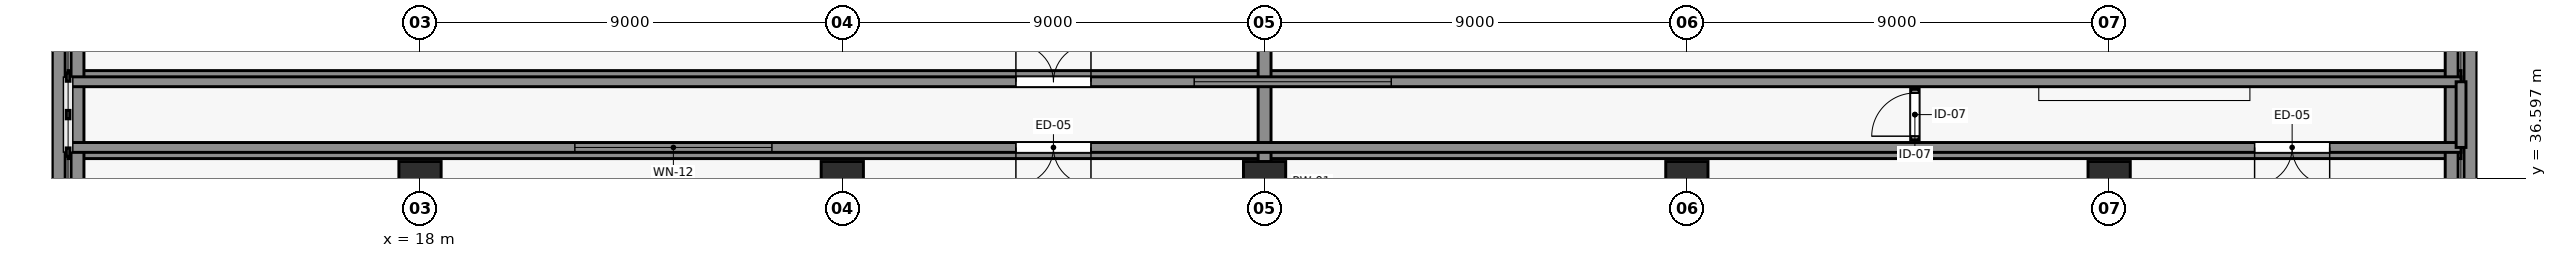
"""IFC4 building model, lengths in metres.
Left out: names, types, materials, properties, quantities, classifications, styles, units other than length and angle.
Written with IfcOpenShell. Run it as: python <this file> out.ifc"""

import sys

from ifc_helpers import new_model, si_unit, direction, frame, frame_2d, origin, origin_2d, place, context, subcontext, project, spatial, rectangle, extrude, element, fill, save


model = new_model("IFC4")
c1 = context("Model", 3, precision=1e-05, world=origin(), true_north=direction((0.0, 1.0)))
c2 = subcontext(c1, "Body", "Model", "MODEL_VIEW")
j1 = project(units=[si_unit("LENGTHUNIT", "METRE"), si_unit("PLANEANGLEUNIT", "RADIAN")], contexts=[c1])
p1 = place(None, origin())
s1 = spatial("IfcSite", under=j1, at=p1, CompositionType="ELEMENT")
p2 = place(p1, origin())
s2 = spatial("IfcBuilding", under=s1, at=p2, CompositionType="ELEMENT")
p3 = place(p2, origin())
s3 = spatial("IfcBuildingStorey", under=s2, at=p3, CompositionType="ELEMENT", Elevation=0.0)
for number, where, z_axis, x_axis in (
    (1, (10.5, 37.15, 0.0), (0.0, 0.0, 1.0), (1.0, 0.0, 0.0)),
    (2, (10.5, 38.75, 0.0), (0.0, 0.0, 1.0), (1.0, 0.0, 0.0)),
):
    element("IfcWall", number, at=place(p3, frame(where, z_axis=z_axis, x_axis=x_axis)), inside=s3, PredefinedType="SOLIDWALL", context=c2, shape_type="SweptSolid", body=[
        extrude(rectangle(XDim=51.0, YDim=0.275, at=frame_2d((25.5, 0.0))), origin(), (0.0, 0.0, 1.0), 0.675),
    ])
for number, where, z_axis, x_axis in (
    (3, (10.3, 36.15, 0.0), (0.0, 0.0, 1.0), (0.0, 1.0, 0.0)),
    (4, (10.7, 36.15, 0.0), (0.0, 0.0, 1.0), (0.0, 1.0, 0.0)),
    (5, (36.0, 36.15, 0.0), (0.0, 0.0, 1.0), (0.0, 1.0, 0.0)),
    (6, (61.3, 36.15, 0.0), (0.0, 0.0, 1.0), (0.0, 1.0, 0.0)),
    (7, (61.7, 36.15, 0.0), (0.0, 0.0, 1.0), (0.0, 1.0, 0.0)),
):
    element("IfcWall", number, at=place(p3, frame(where, z_axis=z_axis, x_axis=x_axis)), inside=s3, PredefinedType="SOLIDWALL", context=c2, shape_type="SweptSolid", body=[
        extrude(rectangle(XDim=3.6, YDim=0.275, at=frame_2d((1.8, 0.0))), origin(), (0.0, 0.0, 1.0), 0.675),
    ])
for number, where, z_axis, x_axis in (
    (8, (18.0, 36.5, 0.0), (0.0, 0.0, 1.0), (1.0, 0.0, 0.0)),
    (9, (27.0, 36.5, 0.0), (0.0, 0.0, 1.0), (1.0, 0.0, 0.0)),
    (10, (36.0, 36.5, 0.0), (0.0, 0.0, 1.0), (1.0, 0.0, 0.0)),
    (11, (45.0, 36.5, 0.0), (0.0, 0.0, 1.0), (1.0, 0.0, 0.0)),
    (12, (54.0, 36.5, 0.0), (0.0, 0.0, 1.0), (1.0, 0.0, 0.0)),
):
    element("IfcColumn", number, at=place(p3, frame(where, z_axis=z_axis, x_axis=x_axis)), inside=s3, PredefinedType="COLUMN", context=c2, shape_type="SweptSolid", body=[
        extrude(rectangle(XDim=0.9, YDim=0.9, at=origin_2d()), origin(), (0.0, 0.0, 1.0), 4.8),
    ])
p4 = place(p3, frame((61.5, 37.25, 0.915), z_axis=(0.0, 0.0, 1.0), x_axis=(-1.0, 0.0, 0.0)))
e13 = element("IfcWall", 13, at=p4, inside=s3, PredefinedType="SOLIDWALL", context=c2, shape_type="SweptSolid", body=[
    extrude(rectangle(XDim=51.0, YDim=0.21, at=frame_2d((25.5, 0.0))), origin(), (0.0, 0.0, 1.0), 3.185),
])
p5 = place(p4, frame((29.2, 0.0, 0.0)))
e14 = element("IfcOpeningElement", 14, at=p5, cuts=e13, PredefinedType="OPENING", context=c2, shape_type="SweptSolid", body=[
    extrude(rectangle(XDim=1.6, YDim=2.3, at=frame_2d((0.8, 1.15))), frame((0.0, 0.115, 0.0), z_axis=(0.0, -1.0, 0.0), x_axis=(1.0, 0.0, 0.0)), (0.0, 0.0, 1.0), 0.23),
])
p6 = place(p4, frame((2.8, 0.0, 0.0)))
e15 = element("IfcOpeningElement", 15, at=p6, cuts=e13, PredefinedType="OPENING", context=c2, shape_type="SweptSolid", body=[
    extrude(rectangle(XDim=1.6, YDim=2.3, at=frame_2d((0.8, 1.15))), frame((0.0, 0.115, 0.0), z_axis=(0.0, -1.0, 0.0), x_axis=(1.0, 0.0, 0.0)), (0.0, 0.0, 1.0), 0.23),
])
p7 = place(p4, frame((36.0, 0.0, 0.9)))
e16 = element("IfcOpeningElement", 16, at=p7, cuts=e13, PredefinedType="OPENING", context=c2, shape_type="SweptSolid", body=[
    extrude(rectangle(XDim=4.2, YDim=1.5, at=frame_2d((2.1, 0.75))), frame((0.0, 0.115, 0.0), z_axis=(0.0, -1.0, 0.0), x_axis=(1.0, 0.0, 0.0)), (0.0, 0.0, 1.0), 0.23),
])
p8 = place(p3, frame((10.5, 38.65, 0.915), z_axis=(0.0, 0.0, 1.0), x_axis=(1.0, 0.0, 0.0)))
e17 = element("IfcWall", 17, at=p8, inside=s3, PredefinedType="SOLIDWALL", context=c2, shape_type="SweptSolid", body=[
    extrude(rectangle(XDim=51.0, YDim=0.21, at=frame_2d((25.5, 0.0))), origin(), (0.0, 0.0, 1.0), 3.185),
])
p9 = place(p8, frame((20.2, 0.0, 0.0)))
e18 = element("IfcOpeningElement", 18, at=p9, cuts=e17, PredefinedType="OPENING", context=c2, shape_type="SweptSolid", body=[
    extrude(rectangle(XDim=1.6, YDim=2.3, at=frame_2d((0.8, 1.15))), frame((0.0, 0.115, 0.0), z_axis=(0.0, -1.0, 0.0), x_axis=(1.0, 0.0, 0.0)), (0.0, 0.0, 1.0), 0.23),
])
p10 = place(p8, frame((24.0, 0.0, 0.9)))
e19 = element("IfcOpeningElement", 19, at=p10, cuts=e17, PredefinedType="OPENING", context=c2, shape_type="SweptSolid", body=[
    extrude(rectangle(XDim=4.2, YDim=1.5, at=frame_2d((2.1, 0.75))), frame((0.0, 0.115, 0.0), z_axis=(0.0, -1.0, 0.0), x_axis=(1.0, 0.0, 0.0)), (0.0, 0.0, 1.0), 0.23),
])
p11 = place(p3, frame((61.5, 38.65, 0.915), z_axis=(0.0, 0.0, 1.0), x_axis=(0.0, -1.0, 0.0)))
e20 = element("IfcWall", 20, at=p11, inside=s3, PredefinedType="SOLIDWALL", context=c2, shape_type="SweptSolid", body=[
    extrude(rectangle(XDim=1.4, YDim=0.21, at=frame_2d((0.7, 0.0))), origin(), (0.0, 0.0, 1.0), 3.185),
])
p12 = place(p3, frame((49.86, 37.41, 0.915), z_axis=(0.0, 0.0, 1.0), x_axis=(0.0, 1.0, 0.0)))
e21 = element("IfcWall", 21, at=p12, inside=s3, PredefinedType="PARTITIONING", context=c2, shape_type="SweptSolid", body=[
    extrude(rectangle(XDim=1.08, YDim=0.18, at=frame_2d((0.54, 0.0))), origin(), (0.0, 0.0, 1.0), 3.435),
])
p13 = place(p12, frame((0.08, 0.0, 0.0)))
e22 = element("IfcOpeningElement", 22, at=p13, cuts=e21, PredefinedType="OPENING", context=c2, shape_type="SweptSolid", body=[
    extrude(rectangle(XDim=0.92, YDim=2.1, at=frame_2d((0.46, 1.05))), frame((0.0, 0.1, 0.0), z_axis=(0.0, -1.0, 0.0), x_axis=(1.0, 0.0, 0.0)), (0.0, 0.0, 1.0), 0.2),
])
p14 = place(p5, origin())
e23 = element("IfcDoor", 23, at=p14, inside=s3, OperationType="DOUBLE_DOOR_SINGLE_SWING", PredefinedType="DOOR", context=c2, shape_type="SweptSolid", body=[
    extrude(rectangle(XDim=1.6, YDim=2.3, at=frame_2d((0.8, 1.15))), frame((0.0, 0.025, 0.0), z_axis=(0.0, -1.0, 0.0), x_axis=(1.0, 0.0, 0.0)), (0.0, 0.0, 1.0), 0.05),
])
fill(e14, e23)
p15 = place(p6, origin())
e24 = element("IfcDoor", 24, at=p15, inside=s3, OperationType="DOUBLE_DOOR_SINGLE_SWING", PredefinedType="DOOR", context=c2, shape_type="SweptSolid", body=[
    extrude(rectangle(XDim=1.6, YDim=2.3, at=frame_2d((0.8, 1.15))), frame((0.0, 0.025, 0.0), z_axis=(0.0, -1.0, 0.0), x_axis=(1.0, 0.0, 0.0)), (0.0, 0.0, 1.0), 0.05),
])
fill(e15, e24)
p16 = place(p9, origin())
e25 = element("IfcDoor", 25, at=p16, inside=s3, OperationType="DOUBLE_DOOR_SINGLE_SWING", PredefinedType="DOOR", context=c2, shape_type="SweptSolid", body=[
    extrude(rectangle(XDim=1.6, YDim=2.3, at=frame_2d((0.8, 1.15))), frame((0.0, 0.025, 0.0), z_axis=(0.0, -1.0, 0.0), x_axis=(1.0, 0.0, 0.0)), (0.0, 0.0, 1.0), 0.05),
])
fill(e18, e25)
p17 = place(p7, origin())
e26 = element("IfcWindow", 26, at=p17, inside=s3, PartitioningType="SINGLE_PANEL", PredefinedType="WINDOW", context=c2, shape_type="SweptSolid", body=[
    extrude(rectangle(XDim=4.2, YDim=1.5, at=frame_2d((2.1, 0.75))), frame((0.0, 0.03, 0.0), z_axis=(0.0, -1.0, 0.0), x_axis=(1.0, 0.0, 0.0)), (0.0, 0.0, 1.0), 0.06),
])
fill(e16, e26)
p18 = place(p10, origin())
e27 = element("IfcWindow", 27, at=p18, inside=s3, PartitioningType="SINGLE_PANEL", PredefinedType="WINDOW", context=c2, shape_type="SweptSolid", body=[
    extrude(rectangle(XDim=4.2, YDim=1.5, at=frame_2d((2.1, 0.75))), frame((0.0, 0.03, 0.0), z_axis=(0.0, -1.0, 0.0), x_axis=(1.0, 0.0, 0.0)), (0.0, 0.0, 1.0), 0.06),
])
fill(e19, e27)
p19 = place(p13, origin())
e28 = element("IfcDoor", 28, at=p19, inside=s3, OperationType="SINGLE_SWING_LEFT", PredefinedType="DOOR", context=c2, shape_type="SweptSolid", body=[
    extrude(rectangle(XDim=0.92, YDim=2.1, at=frame_2d((0.46, 1.05))), frame((0.0, 0.025, 0.0), z_axis=(0.0, -1.0, 0.0), x_axis=(1.0, 0.0, 0.0)), (0.0, 0.0, 1.0), 0.05),
])
fill(e22, e28)
save(model, sys.argv[1])
